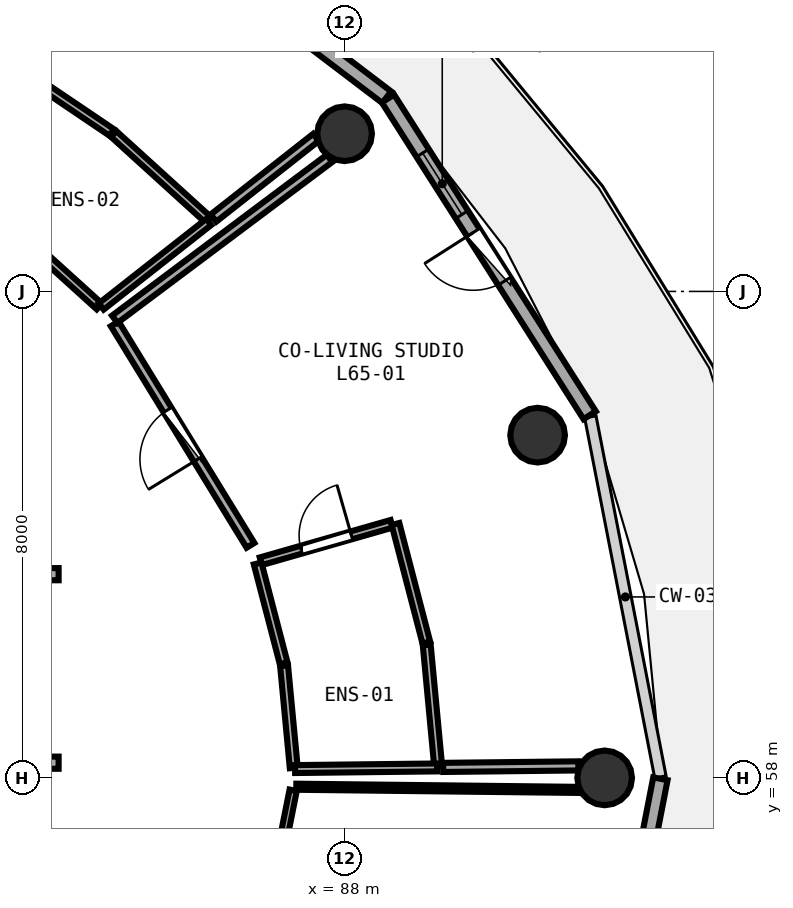
"""IFC4 building model, lengths in metres.
Left out: names, types, materials, properties, quantities, classifications, styles, units other than length and angle.
Written with IfcOpenShell. Run it as: python <this file> out.ifc"""

import sys

from ifc_helpers import new_model, si_unit, direction, frame, frame_2d, origin, origin_2d, place, context, subcontext, project, spatial, rectangle, circle, extrude, element, fill, save


model = new_model("IFC4")
c1 = context("Model", 3, precision=1e-05, world=origin(), true_north=direction((0.0, 1.0)))
c2 = subcontext(c1, "Body", "Model", "MODEL_VIEW")
j1 = project(units=[si_unit("LENGTHUNIT", "METRE"), si_unit("PLANEANGLEUNIT", "RADIAN")], contexts=[c1])
p1 = place(None, origin())
s1 = spatial("IfcSite", under=j1, at=p1, CompositionType="ELEMENT")
p2 = place(p1, origin())
s2 = spatial("IfcBuilding", under=s1, at=p2, CompositionType="ELEMENT")
p3 = place(p2, frame((0.0, 0.0, 256.2)))
s3 = spatial("IfcBuildingStorey", under=s2, at=p3, CompositionType="ELEMENT", Elevation=256.2)
for number, where, z_axis, x_axis in (
    (1, (92.28, 58.0, 0.0), (0.0, 0.0, 1.0), (1.0, 0.0, 0.0)),
    (2, (91.177, 63.636, 0.0), (0.0, 0.0, 1.0), (1.0, 0.0, 0.0)),
    (3, (88.003, 68.593, 0.0), (0.0, 0.0, 1.0), (1.0, 0.0, 0.0)),
):
    element("IfcColumn", number, at=place(p3, frame(where, z_axis=z_axis, x_axis=x_axis)), inside=s3, PredefinedType="COLUMN", context=c2, shape_type="SweptSolid", body=[
        extrude(circle(Radius=0.45, at=origin_2d()), origin(), (0.0, 0.0, 1.0), 3.75),
    ])
p4 = place(p3, frame((92.034, 63.964, 0.0), z_axis=(0.0, 0.0, 1.0), x_axis=(-0.537271968456, 0.843409053728, 0.0)))
e4 = element("IfcWall", 4, at=p4, inside=s3, PredefinedType="SOLIDWALL", context=c2, shape_type="SweptSolid", body=[
    extrude(rectangle(XDim=6.175, YDim=0.24, at=frame_2d((3.087, 0.0))), origin(), (0.0, 0.0, 1.0), 3.475),
])
p5 = place(p4, frame((2.613, 0.0, 0.0)))
e5 = element("IfcOpeningElement", 5, at=p5, cuts=e4, PredefinedType="OPENING", context=c2, shape_type="SweptSolid", body=[
    extrude(rectangle(XDim=0.95, YDim=2.1, at=frame_2d((0.475, 1.05))), frame((0.0, 0.13, 0.0), z_axis=(0.0, -1.0, 0.0), x_axis=(1.0, 0.0, 0.0)), (0.0, 0.0, 1.0), 0.26),
])
p6 = place(p4, frame((3.913, 0.0, 0.85)))
e6 = element("IfcOpeningElement", 6, at=p6, cuts=e4, PredefinedType="OPENING", context=c2, shape_type="SweptSolid", body=[
    extrude(rectangle(XDim=1.2, YDim=1.45, at=frame_2d((0.6, 0.725))), frame((0.0, 0.13, 0.0), z_axis=(0.0, -1.0, 0.0), x_axis=(1.0, 0.0, 0.0)), (0.0, 0.0, 1.0), 0.26),
])
p7 = place(p3, frame((88.696, 69.194, 0.0), z_axis=(0.0, 0.0, 1.0), x_axis=(-0.796010444211, 0.605282886514, 0.0)))
e7 = element("IfcWall", 7, at=p7, inside=s3, PredefinedType="SOLIDWALL", context=c2, shape_type="SweptSolid", body=[
    extrude(rectangle(XDim=6.387, YDim=0.24, at=frame_2d((3.194, 0.0))), origin(), (0.0, 0.0, 1.0), 3.475),
])
p8 = place(p7, frame((2.719, 0.0, 0.0)))
e8 = element("IfcOpeningElement", 8, at=p8, cuts=e7, PredefinedType="OPENING", context=c2, shape_type="SweptSolid", body=[
    extrude(rectangle(XDim=0.95, YDim=2.1, at=frame_2d((0.475, 1.05))), frame((0.0, 0.13, 0.0), z_axis=(0.0, -1.0, 0.0), x_axis=(1.0, 0.0, 0.0)), (0.0, 0.0, 1.0), 0.26),
])
p9 = place(p7, frame((4.019, 0.0, 0.85)))
e9 = element("IfcOpeningElement", 9, at=p9, cuts=e7, PredefinedType="OPENING", context=c2, shape_type="SweptSolid", body=[
    extrude(rectangle(XDim=1.2, YDim=1.45, at=frame_2d((0.6, 0.725))), frame((0.0, 0.13, 0.0), z_axis=(0.0, -1.0, 0.0), x_axis=(1.0, 0.0, 0.0)), (0.0, 0.0, 1.0), 0.26),
])
p10 = place(p3, frame((92.045, 52.063, 0.0), z_axis=(0.0, 0.0, 1.0), x_axis=(0.190969309115, 0.981596008028, 0.0)))
e10 = element("IfcWall", 10, at=p10, inside=s3, PredefinedType="SOLIDWALL", context=c2, shape_type="SweptSolid", body=[
    extrude(rectangle(XDim=6.033, YDim=0.24, at=frame_2d((3.017, 0.0))), origin(), (0.0, 0.0, 1.0), 3.475),
])
p11 = place(p10, frame((2.216, 0.0, 0.85)))
e11 = element("IfcOpeningElement", 11, at=p11, cuts=e10, PredefinedType="OPENING", context=c2, shape_type="SweptSolid", body=[
    extrude(rectangle(XDim=1.6, YDim=1.45, at=frame_2d((0.8, 0.725))), frame((0.0, 0.13, 0.0), z_axis=(0.0, -1.0, 0.0), x_axis=(1.0, 0.0, 0.0)), (0.0, 0.0, 1.0), 0.26),
])
p12 = place(p3, frame((79.3, 61.35, 0.0), z_axis=(0.0, 0.0, 1.0), x_axis=(1.0, 0.0, 0.0)))
e12 = element("IfcWall", 12, at=p12, inside=s3, PredefinedType="SOLIDWALL", context=c2, shape_type="SweptSolid", body=[
    extrude(rectangle(XDim=4.0, YDim=0.2, at=frame_2d((2.0, 0.0))), origin(), (0.0, 0.0, 1.0), 2.775),
])
p13 = place(p12, frame((0.45, 0.0, 0.0)))
e13 = element("IfcOpeningElement", 13, at=p13, cuts=e12, PredefinedType="OPENING", context=c2, shape_type="SweptSolid", body=[
    extrude(rectangle(XDim=1.2, YDim=2.15, at=frame_2d((0.6, 1.075))), frame((0.0, 0.11, 0.0), z_axis=(0.0, -1.0, 0.0), x_axis=(1.0, 0.0, 0.0)), (0.0, 0.0, 1.0), 0.22),
])
p14 = place(p3, frame((79.3, 58.25, 0.0), z_axis=(0.0, 0.0, 1.0), x_axis=(1.0, 0.0, 0.0)))
e14 = element("IfcWall", 14, at=p14, inside=s3, PredefinedType="SOLIDWALL", context=c2, shape_type="SweptSolid", body=[
    extrude(rectangle(XDim=4.0, YDim=0.2, at=frame_2d((2.0, 0.0))), origin(), (0.0, 0.0, 1.0), 2.775),
])
p15 = place(p14, frame((0.5, 0.0, 0.0)))
e15 = element("IfcOpeningElement", 15, at=p15, cuts=e14, PredefinedType="OPENING", context=c2, shape_type="SweptSolid", body=[
    extrude(rectangle(XDim=1.1, YDim=2.1, at=frame_2d((0.55, 1.05))), frame((0.0, 0.11, 0.0), z_axis=(0.0, -1.0, 0.0), x_axis=(1.0, 0.0, 0.0)), (0.0, 0.0, 1.0), 0.22),
])
p16 = place(p3, frame((86.626, 61.562, 0.0), z_axis=(0.0, 0.0, 1.0), x_axis=(0.961379738838, 0.275225358117, 0.0)))
e16 = element("IfcWall", 16, at=p16, inside=s3, PredefinedType="PLUMBINGWALL", context=c2, shape_type="SweptSolid", body=[
    extrude(rectangle(XDim=2.238, YDim=0.13, at=frame_2d((1.119, 0.0))), origin(), (0.0, 0.0, 1.0), 3.175),
])
p17 = place(p16, frame((0.689, 0.0, 0.0)))
e17 = element("IfcOpeningElement", 17, at=p17, cuts=e16, PredefinedType="OPENING", context=c2, shape_type="SweptSolid", body=[
    extrude(rectangle(XDim=0.86, YDim=2.05, at=frame_2d((0.43, 1.025))), frame((0.0, 0.075, 0.0), z_axis=(0.0, -1.0, 0.0), x_axis=(1.0, 0.0, 0.0)), (0.0, 0.0, 1.0), 0.15),
])
p18 = place(p3, frame((86.456, 61.824, 0.0), z_axis=(0.0, 0.0, 1.0), x_axis=(-0.522665227064, 0.852538011128, 0.0)))
e18 = element("IfcWall", 18, at=p18, inside=s3, PredefinedType="PARTITIONING", context=c2, shape_type="SweptSolid", body=[
    extrude(rectangle(XDim=4.273, YDim=0.15, at=frame_2d((2.136, 0.0))), origin(), (0.0, 0.0, 1.0), 3.075),
])
p19 = place(p18, frame((1.661, 0.0, 0.0)))
e19 = element("IfcOpeningElement", 19, at=p19, cuts=e18, PredefinedType="OPENING", context=c2, shape_type="SweptSolid", body=[
    extrude(rectangle(XDim=0.95, YDim=2.08, at=frame_2d((0.475, 1.04))), frame((0.0, 0.085, 0.0), z_axis=(0.0, -1.0, 0.0), x_axis=(1.0, 0.0, 0.0)), (0.0, 0.0, 1.0), 0.17),
])
p20 = place(p3, frame((86.411, 54.058, 0.0), z_axis=(0.0, 0.0, 1.0), x_axis=(0.195845174173, 0.980634828952, 0.0)))
e20 = element("IfcWall", 20, at=p20, inside=s3, PredefinedType="PARTITIONING", context=c2, shape_type="SweptSolid", body=[
    extrude(rectangle(XDim=3.812, YDim=0.12, at=frame_2d((1.906, 0.0))), origin(), (0.0, 0.0, 1.0), 3.48),
])
p21 = place(p20, frame((1.456, 0.0, 0.0)))
e21 = element("IfcOpeningElement", 21, at=p21, cuts=e20, PredefinedType="OPENING", context=c2, shape_type="SweptSolid", body=[
    extrude(rectangle(XDim=0.9, YDim=2.08, at=frame_2d((0.45, 1.04))), frame((0.0, 0.07, 0.0), z_axis=(0.0, -1.0, 0.0), x_axis=(1.0, 0.0, 0.0)), (0.0, 0.0, 1.0), 0.14),
])
p22 = place(p3, frame((87.167, 58.165, 0.0), z_axis=(0.0, 0.0, 1.0), x_axis=(-0.094303984979, 0.995543448784, 0.0)))
e22 = element("IfcWall", 22, at=p22, inside=s3, PredefinedType="PLUMBINGWALL", context=c2, shape_type="SweptSolid", body=[
    extrude(rectangle(XDim=1.688, YDim=0.13, at=frame_2d((0.844, 0.0))), origin(), (0.0, 0.0, 1.0), 3.075),
])
p23 = place(p3, frame((87.001, 59.885, 0.0), z_axis=(0.0, 0.0, 1.0), x_axis=(-0.252205193656, 0.967673777826, 0.0)))
e23 = element("IfcWall", 23, at=p23, inside=s3, PredefinedType="PLUMBINGWALL", context=c2, shape_type="SweptSolid", body=[
    extrude(rectangle(XDim=1.697, YDim=0.13, at=frame_2d((0.849, 0.0))), origin(), (0.0, 0.0, 1.0), 3.48),
])
p24 = place(p3, frame((88.84, 62.176, 0.0), z_axis=(0.0, 0.0, 1.0), x_axis=(0.251652018774, -0.967817783184, 0.0)))
e24 = element("IfcWall", 24, at=p24, inside=s3, PredefinedType="PLUMBINGWALL", context=c2, shape_type="SweptSolid", body=[
    extrude(rectangle(XDim=2.014, YDim=0.13, at=frame_2d((1.007, 0.0))), origin(), (0.0, 0.0, 1.0), 3.48),
])
p25 = place(p3, frame((89.354, 60.187, 0.0), z_axis=(0.0, 0.0, 1.0), x_axis=(0.09380867442, -0.995590243325, 0.0)))
e25 = element("IfcWall", 25, at=p25, inside=s3, PredefinedType="PLUMBINGWALL", context=c2, shape_type="SweptSolid", body=[
    extrude(rectangle(XDim=2.004, YDim=0.13, at=frame_2d((1.002, 0.0))), origin(), (0.0, 0.0, 1.0), 3.48),
])
p26 = place(p3, frame((89.524, 58.172, 0.0), z_axis=(0.0, 0.0, 1.0), x_axis=(-0.999935061604, -0.011396164964, 0.0)))
e26 = element("IfcWall", 26, at=p26, inside=s3, PredefinedType="PLUMBINGWALL", context=c2, shape_type="SweptSolid", body=[
    extrude(rectangle(XDim=2.335, YDim=0.13, at=frame_2d((1.167, 0.0))), origin(), (0.0, 0.0, 1.0), 3.075),
])
p27 = place(p3, frame((84.223, 65.542, 0.0), z_axis=(0.0, 0.0, 1.0), x_axis=(0.800384816546, 0.599486568191, 0.0)))
e27 = element("IfcWall", 27, at=p27, inside=s3, PredefinedType="PARTITIONING", context=c2, shape_type="SweptSolid", body=[
    extrude(rectangle(XDim=4.414, YDim=0.15, at=frame_2d((2.207, 0.0))), origin(), (0.0, 0.0, 1.0), 3.175),
])
p28 = place(p3, frame((91.848, 58.198, 0.0), z_axis=(0.0, 0.0, 1.0), x_axis=(-0.999936076373, -0.011306775263, 0.0)))
e28 = element("IfcWall", 28, at=p28, inside=s3, PredefinedType="PARTITIONING", context=c2, shape_type="SweptSolid", body=[
    extrude(rectangle(XDim=2.224, YDim=0.15, at=frame_2d((1.112, 0.0))), origin(), (0.0, 0.0, 1.0), 3.075),
])
p29 = place(p3, frame((83.97, 65.753, 0.0), z_axis=(0.0, 0.0, 1.0), x_axis=(-0.741337974143, 0.671131885767, 0.0)))
e29 = element("IfcWall", 29, at=p29, inside=s3, PredefinedType="PLUMBINGWALL", context=c2, shape_type="SweptSolid", body=[
    extrude(rectangle(XDim=1.784, YDim=0.13, at=frame_2d((0.892, 0.0))), origin(), (0.0, 0.0, 1.0), 3.075),
])
p30 = place(p3, frame((82.396, 69.815, 0.0), z_axis=(0.0, 0.0, 1.0), x_axis=(0.828761584291, -0.559601855254, 0.0)))
e30 = element("IfcWall", 30, at=p30, inside=s3, PredefinedType="PLUMBINGWALL", context=c2, shape_type="SweptSolid", body=[
    extrude(rectangle(XDim=2.145, YDim=0.13, at=frame_2d((1.073, 0.0))), origin(), (0.0, 0.0, 1.0), 3.075),
])
p31 = place(p3, frame((84.205, 68.59, 0.0), z_axis=(0.0, 0.0, 1.0), x_axis=(0.740404918602, -0.672161109043, 0.0)))
e31 = element("IfcWall", 31, at=p31, inside=s3, PredefinedType="PLUMBINGWALL", context=c2, shape_type="SweptSolid", body=[
    extrude(rectangle(XDim=2.114, YDim=0.13, at=frame_2d((1.057, 0.0))), origin(), (0.0, 0.0, 1.0), 3.075),
])
p32 = place(p3, frame((85.769, 67.143, 0.0), z_axis=(0.0, 0.0, 1.0), x_axis=(-0.786197810061, -0.617974921381, 0.0)))
e32 = element("IfcWall", 32, at=p32, inside=s3, PredefinedType="PLUMBINGWALL", context=c2, shape_type="SweptSolid", body=[
    extrude(rectangle(XDim=2.25, YDim=0.13, at=frame_2d((1.125, 0.0))), origin(), (0.0, 0.0, 1.0), 3.075),
])
p33 = place(p3, frame((87.532, 68.533, 0.0), z_axis=(0.0, 0.0, 1.0), x_axis=(-0.785832073147, -0.618439934685, 0.0)))
e33 = element("IfcWall", 33, at=p33, inside=s3, PredefinedType="PARTITIONING", context=c2, shape_type="SweptSolid", body=[
    extrude(rectangle(XDim=2.144, YDim=0.15, at=frame_2d((1.072, 0.0))), origin(), (0.0, 0.0, 1.0), 3.075),
])
p34 = place(p3, frame((87.209, 57.854, 0.0), z_axis=(0.0, 0.0, 1.0), x_axis=(0.999937174585, -0.01120923205, 0.0)))
e34 = element("IfcWall", 34, at=p34, inside=s3, PredefinedType="PARTITIONING", context=c2, shape_type="SweptSolid", body=[
    extrude(rectangle(XDim=4.639, YDim=0.1, at=frame_2d((2.32, 0.0))), origin(), (0.0, 0.0, 1.0), 3.075),
])
p35 = place(p5, frame((0.95, 0.0, 0.0), z_axis=(0.0, 0.0, 1.0), x_axis=(-1.0, 0.0, 0.0)))
e35 = element("IfcDoor", 35, at=p35, inside=s3, OperationType="SINGLE_SWING_LEFT", PredefinedType="DOOR", context=c2, shape_type="SweptSolid", body=[
    extrude(rectangle(XDim=0.95, YDim=2.1, at=frame_2d((0.475, 1.05))), frame((0.0, 0.025, 0.0), z_axis=(0.0, -1.0, 0.0), x_axis=(1.0, 0.0, 0.0)), (0.0, 0.0, 1.0), 0.05),
])
fill(e5, e35)
p36 = place(p6, origin())
e36 = element("IfcWindow", 36, at=p36, inside=s3, PartitioningType="SINGLE_PANEL", PredefinedType="WINDOW", context=c2, shape_type="SweptSolid", body=[
    extrude(rectangle(XDim=1.2, YDim=1.45, at=frame_2d((0.6, 0.725))), frame((0.0, 0.03, 0.0), z_axis=(0.0, -1.0, 0.0), x_axis=(1.0, 0.0, 0.0)), (0.0, 0.0, 1.0), 0.06),
])
fill(e6, e36)
p37 = place(p17, origin())
e37 = element("IfcDoor", 37, at=p37, inside=s3, OperationType="SINGLE_SWING_RIGHT", PredefinedType="DOOR", context=c2, shape_type="SweptSolid", body=[
    extrude(rectangle(XDim=0.86, YDim=2.05, at=frame_2d((0.43, 1.025))), frame((0.0, 0.025, 0.0), z_axis=(0.0, -1.0, 0.0), x_axis=(1.0, 0.0, 0.0)), (0.0, 0.0, 1.0), 0.05),
])
fill(e17, e37)
p38 = place(p19, origin())
e38 = element("IfcDoor", 38, at=p38, inside=s3, OperationType="SINGLE_SWING_LEFT", PredefinedType="DOOR", context=c2, shape_type="SweptSolid", body=[
    extrude(rectangle(XDim=0.95, YDim=2.08, at=frame_2d((0.475, 1.04))), frame((0.0, 0.025, 0.0), z_axis=(0.0, -1.0, 0.0), x_axis=(1.0, 0.0, 0.0)), (0.0, 0.0, 1.0), 0.05),
])
fill(e19, e38)
save(model, sys.argv[1])
